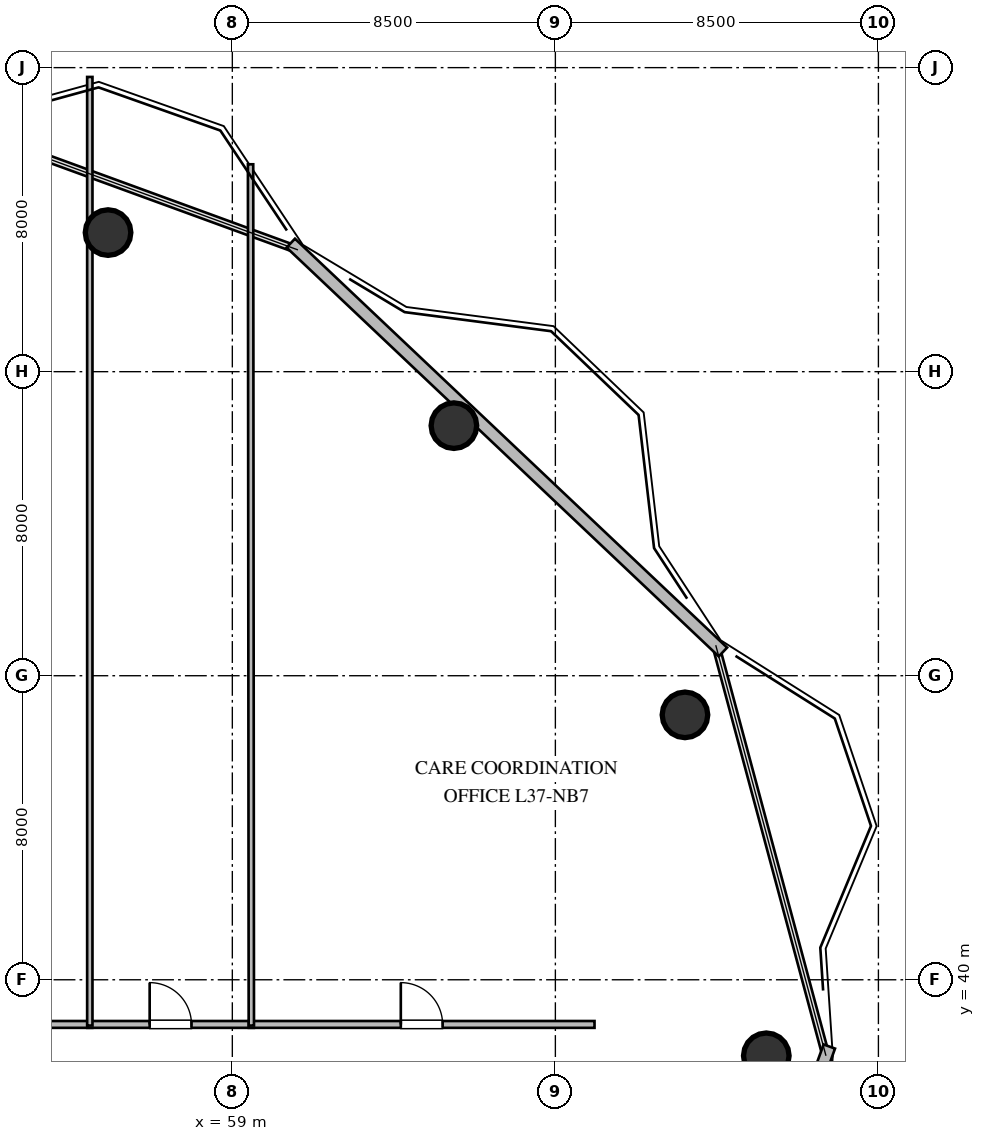
"""IFC4 building model, lengths in metres.
Left out: names, types, materials, properties, quantities, classifications, styles, units other than length and angle.
Written with IfcOpenShell. Run it as: python <this file> out.ifc"""

import sys

from ifc_helpers import new_model, si_unit, direction, frame, frame_2d, origin, origin_2d, place, context, subcontext, project, spatial, rectangle, circle, extrude, element, fill, save


model = new_model("IFC4")
c1 = context("Model", 3, precision=1e-05, world=origin(), true_north=direction((0.0, 1.0)))
c2 = subcontext(c1, "Body", "Model", "MODEL_VIEW")
j1 = project(units=[si_unit("LENGTHUNIT", "METRE"), si_unit("PLANEANGLEUNIT", "RADIAN")], contexts=[c1])
p1 = place(None, origin())
s1 = spatial("IfcSite", under=j1, at=p1, CompositionType="ELEMENT")
p2 = place(p1, origin())
s2 = spatial("IfcBuilding", under=s1, at=p2, CompositionType="ELEMENT")
p3 = place(p2, frame((0.0, 0.0, 142.2)))
s3 = spatial("IfcBuildingStorey", under=s2, at=p3, CompositionType="ELEMENT", Elevation=142.2)
for number, where, z_axis, x_axis in (
    (1, (73.05, 38.0, 0.0), (0.0, 0.0, 1.0), (1.0, 0.0, 0.0)),
    (2, (70.91, 46.97, 0.0), (0.0, 0.0, 1.0), (1.0, 0.0, 0.0)),
    (3, (64.83, 54.58, 0.0), (0.0, 0.0, 1.0), (1.0, 0.0, 0.0)),
    (4, (55.73, 59.66, 0.0), (0.0, 0.0, 1.0), (1.0, 0.0, 0.0)),
):
    element("IfcColumn", number, at=place(p3, frame(where, z_axis=z_axis, x_axis=x_axis)), inside=s3, PredefinedType="COLUMN", context=c2, shape_type="SweptSolid", body=[
        extrude(circle(Radius=0.6, at=origin_2d()), origin(), (0.0, 0.0, 1.0), 3.6),
    ])
p4 = place(p3, frame((74.708, 38.244, 0.0), z_axis=(0.0, 0.0, 1.0), x_axis=(-0.340324669139, -0.94030799187, 0.0)))
e5 = element("IfcWall", 5, at=p4, inside=s3, PredefinedType="STANDARD", context=c2, shape_type="SweptSolid", body=[
    extrude(rectangle(XDim=13.81, YDim=0.32, at=frame_2d((6.905, 0.0))), origin(), (0.0, 0.0, 1.0), 3.36),
])
p5 = place(p3, frame((60.538, 59.383, 0.0), z_axis=(0.0, 0.0, 1.0), x_axis=(0.726378346584, -0.687295058628, 0.0)))
e6 = element("IfcWall", 6, at=p5, inside=s3, PredefinedType="STANDARD", context=c2, shape_type="SweptSolid", body=[
    extrude(rectangle(XDim=15.654, YDim=0.32, at=frame_2d((7.827, 0.0))), origin(), (0.0, 0.0, 1.0), 3.36),
])
p6 = place(p3, frame((50.935, 38.825, 0.0), z_axis=(0.0, 0.0, 1.0), x_axis=(1.0, 0.0, 0.0)))
e7 = element("IfcWall", 7, at=p6, inside=s3, PredefinedType="PARTITIONING", context=c2, shape_type="SweptSolid", body=[
    extrude(rectangle(XDim=4.38, YDim=0.18, at=frame_2d((2.19, 0.0))), origin(), (0.0, 0.0, 1.0), 3.36),
])
p7 = place(p6, frame((1.64, 0.0, 0.0)))
e8 = element("IfcOpeningElement", 8, at=p7, cuts=e7, PredefinedType="OPENING", context=c2, shape_type="SweptSolid", body=[
    extrude(rectangle(XDim=1.1, YDim=2.1, at=frame_2d((0.55, 1.05))), frame((0.0, 0.1, 0.0), z_axis=(0.0, -1.0, 0.0), x_axis=(1.0, 0.0, 0.0)), (0.0, 0.0, 1.0), 0.2),
])
p8 = place(p3, frame((55.185, 38.825, 0.0), z_axis=(0.0, 0.0, 1.0), x_axis=(1.0, 0.0, 0.0)))
e9 = element("IfcWall", 9, at=p8, inside=s3, PredefinedType="PARTITIONING", context=c2, shape_type="SweptSolid", body=[
    extrude(rectangle(XDim=4.38, YDim=0.18, at=frame_2d((2.19, 0.0))), origin(), (0.0, 0.0, 1.0), 3.36),
])
p9 = place(p8, frame((1.64, 0.0, 0.0)))
e10 = element("IfcOpeningElement", 10, at=p9, cuts=e9, PredefinedType="OPENING", context=c2, shape_type="SweptSolid", body=[
    extrude(rectangle(XDim=1.1, YDim=2.1, at=frame_2d((0.55, 1.05))), frame((0.0, 0.1, 0.0), z_axis=(0.0, -1.0, 0.0), x_axis=(1.0, 0.0, 0.0)), (0.0, 0.0, 1.0), 0.2),
])
p10 = place(p3, frame((59.435, 38.825, 0.0), z_axis=(0.0, 0.0, 1.0), x_axis=(1.0, 0.0, 0.0)))
e11 = element("IfcWall", 11, at=p10, inside=s3, PredefinedType="PARTITIONING", context=c2, shape_type="SweptSolid", body=[
    extrude(rectangle(XDim=9.095, YDim=0.18, at=frame_2d((4.547, 0.0))), origin(), (0.0, 0.0, 1.0), 3.36),
])
p11 = place(p10, frame((3.998, 0.0, 0.0)))
e12 = element("IfcOpeningElement", 12, at=p11, cuts=e11, PredefinedType="OPENING", context=c2, shape_type="SweptSolid", body=[
    extrude(rectangle(XDim=1.1, YDim=2.1, at=frame_2d((0.55, 1.05))), frame((0.0, 0.1, 0.0), z_axis=(0.0, -1.0, 0.0), x_axis=(1.0, 0.0, 0.0)), (0.0, 0.0, 1.0), 0.2),
])
p12 = place(p3, frame((55.25, 63.755, 0.0), z_axis=(0.0, 0.0, 1.0), x_axis=(0.0, -1.0, 0.0)))
e13 = element("IfcWall", 13, at=p12, inside=s3, PredefinedType="PARTITIONING", context=c2, shape_type="SweptSolid", body=[
    extrude(rectangle(XDim=24.96, YDim=0.14, at=frame_2d((12.48, 0.0))), origin(), (0.0, 0.0, 1.0), 3.36),
])
p13 = place(p3, frame((59.48, 61.457, 0.0), z_axis=(0.0, 0.0, 1.0), x_axis=(0.000883391881, -0.999999609809, 0.0)))
e14 = element("IfcWall", 14, at=p13, inside=s3, PredefinedType="PARTITIONING", context=c2, shape_type="SweptSolid", body=[
    extrude(rectangle(XDim=22.662, YDim=0.14, at=frame_2d((11.331, 0.0))), origin(), (0.0, 0.0, 1.0), 2.996),
])
p14 = place(p9, origin())
e15 = element("IfcDoor", 15, at=p14, inside=s3, OperationType="SINGLE_SWING_LEFT", PredefinedType="DOOR", context=c2, shape_type="SweptSolid", body=[
    extrude(rectangle(XDim=1.1, YDim=2.1, at=frame_2d((0.55, 1.05))), frame((0.0, 0.025, 0.0), z_axis=(0.0, -1.0, 0.0), x_axis=(1.0, 0.0, 0.0)), (0.0, 0.0, 1.0), 0.05),
])
fill(e10, e15)
p15 = place(p11, origin())
e16 = element("IfcDoor", 16, at=p15, inside=s3, OperationType="SINGLE_SWING_LEFT", PredefinedType="DOOR", context=c2, shape_type="SweptSolid", body=[
    extrude(rectangle(XDim=1.1, YDim=2.1, at=frame_2d((0.55, 1.05))), frame((0.0, 0.025, 0.0), z_axis=(0.0, -1.0, 0.0), x_axis=(1.0, 0.0, 0.0)), (0.0, 0.0, 1.0), 0.05),
])
fill(e12, e16)
save(model, sys.argv[1])
